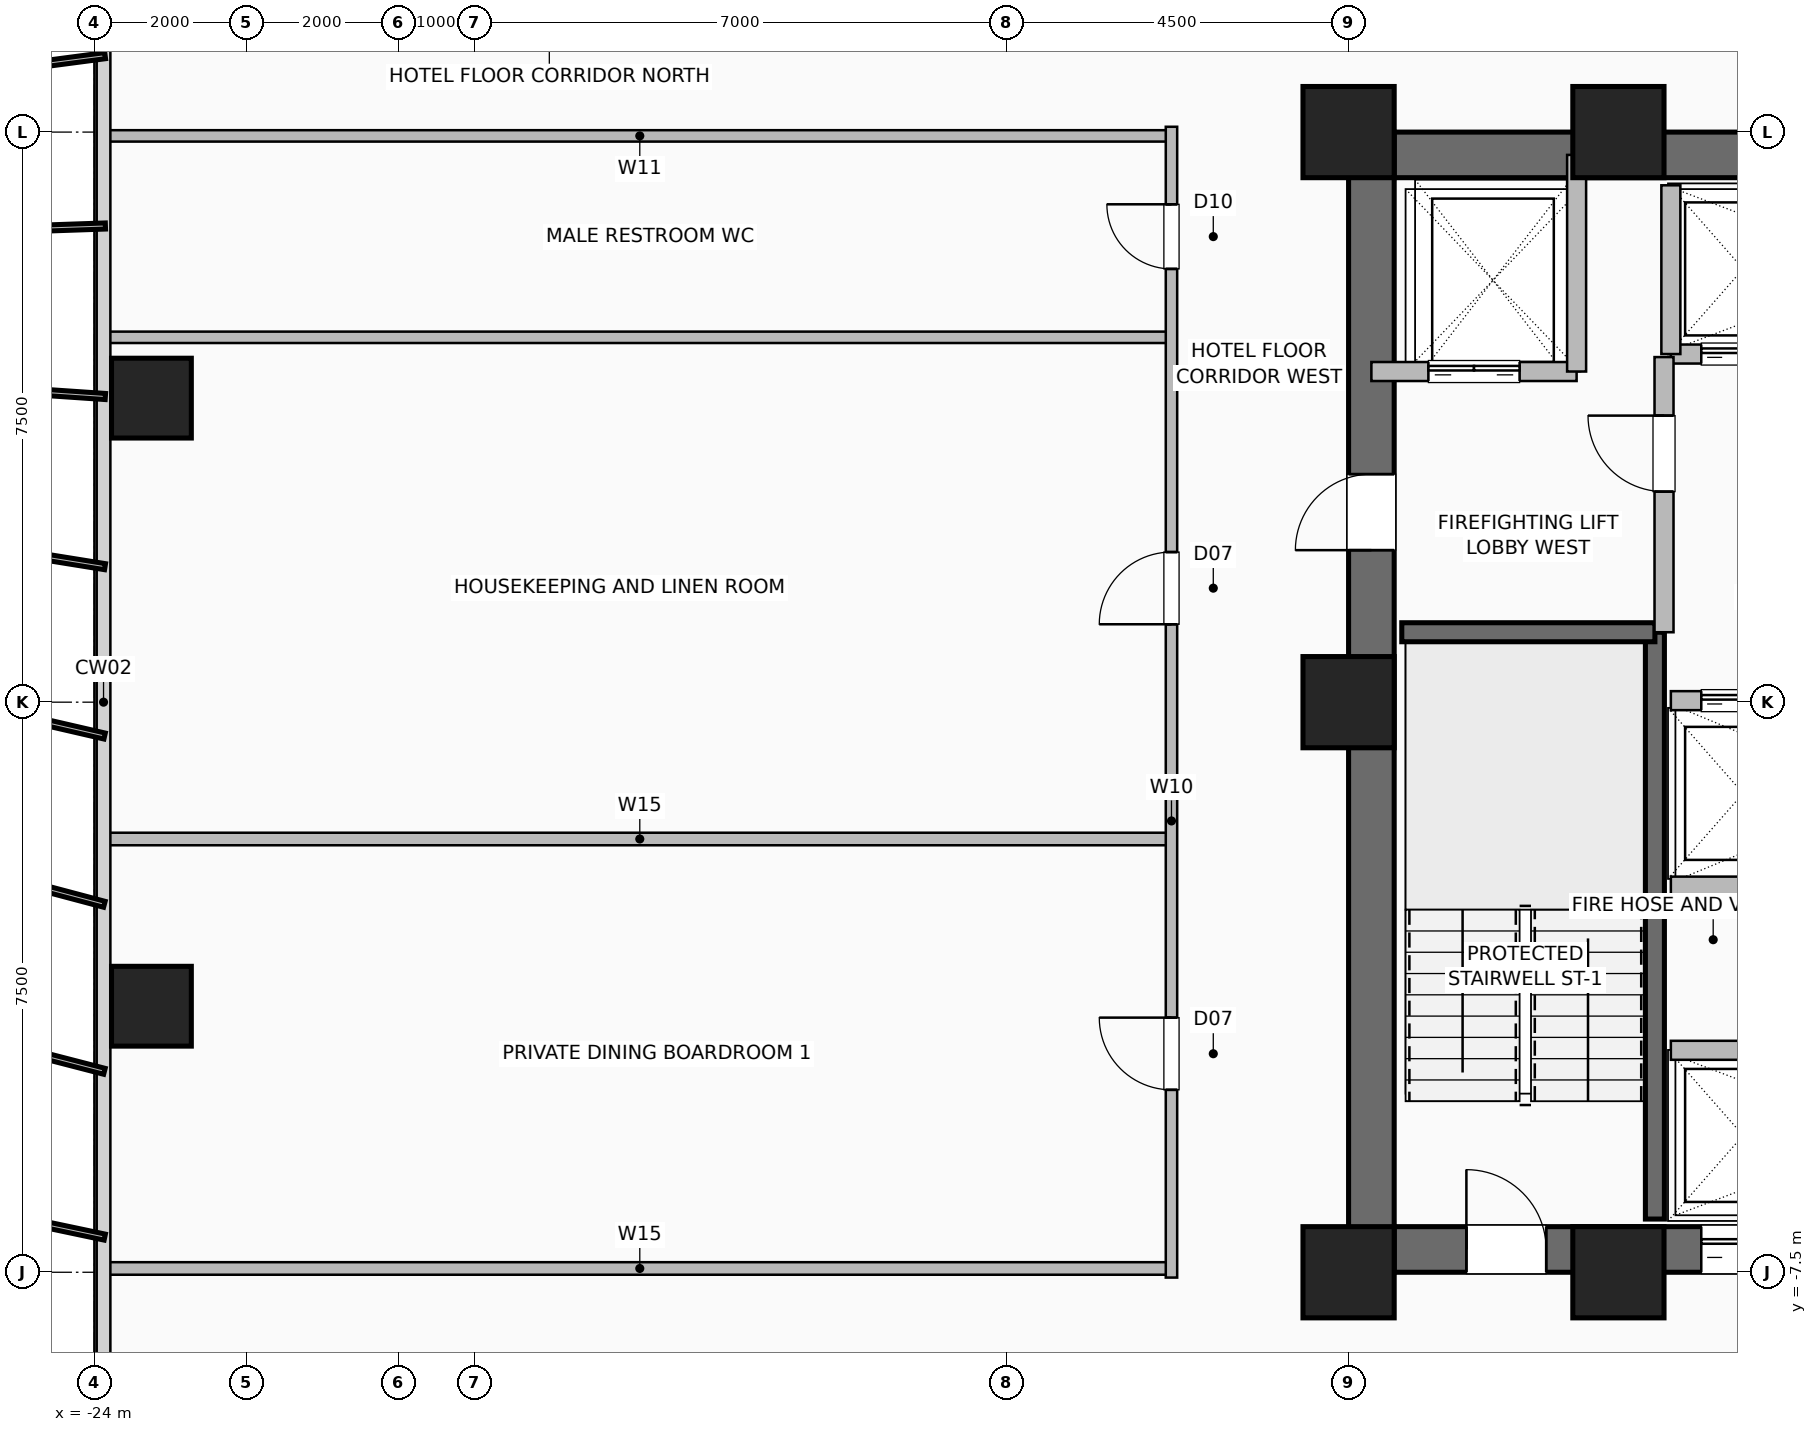
"""IFC4 building model, lengths in metres.
Left out: names, types, materials, properties, quantities, classifications, styles, units other than length and angle.
Written with IfcOpenShell. Run it as: python <this file> out.ifc"""

import sys

from ifc_helpers import new_model, si_unit, direction, frame, frame_2d, origin, origin_2d, place, context, subcontext, project, spatial, rectangle, hollow_rectangle, extrude, element, fill, save


model = new_model("IFC4")
c1 = context("Model", 3, precision=1e-05, world=origin(), true_north=direction((0.0, 1.0)))
c2 = subcontext(c1, "Body", "Model", "MODEL_VIEW")
j1 = project(units=[si_unit("LENGTHUNIT", "METRE"), si_unit("PLANEANGLEUNIT", "RADIAN")], contexts=[c1])
p1 = place(None, origin())
s1 = spatial("IfcSite", under=j1, at=p1, CompositionType="ELEMENT")
p2 = place(p1, origin())
s2 = spatial("IfcBuilding", under=s1, at=p2, CompositionType="ELEMENT")
p3 = place(p2, frame((0.0, 0.0, 69.0)))
s3 = spatial("IfcBuildingStorey", under=s2, at=p3, CompositionType="ELEMENT", Elevation=69.0)
for number, where, z_axis, x_axis in (
    (1, (-7.5, -7.5, 0.0), (0.0, 0.0, 1.0), (1.0, 0.0, 0.0)),
    (2, (-3.95, -7.5, 0.0), (0.0, 0.0, 1.0), (1.0, 0.0, 0.0)),
    (3, (-3.95, 7.5, 0.0), (0.0, 0.0, 1.0), (1.0, 0.0, 0.0)),
    (4, (-7.5, 7.5, 0.0), (0.0, 0.0, 1.0), (1.0, 0.0, 0.0)),
    (5, (-7.5, 0.0, 0.0), (0.0, 0.0, 1.0), (1.0, 0.0, 0.0)),
):
    element("IfcColumn", number, at=place(p3, frame(where, z_axis=z_axis, x_axis=x_axis)), inside=s3, PredefinedType="COLUMN", context=c2, shape_type="SweptSolid", body=[
        extrude(hollow_rectangle(XDim=1.2, YDim=1.2, WallThickness=0.055, at=origin_2d()), origin(), (0.0, 0.0, 1.0), 3.5),
    ])
for number, where, z_axis, x_axis in (
    (6, (-23.25, -4.0, 0.0), (0.0, 0.0, 1.0), (1.0, 0.0, 0.0)),
    (7, (-23.25, 4.0, 0.0), (0.0, 0.0, 1.0), (1.0, 0.0, 0.0)),
):
    element("IfcColumn", number, at=place(p3, frame(where, z_axis=z_axis, x_axis=x_axis)), inside=s3, PredefinedType="COLUMN", context=c2, shape_type="SweptSolid", body=[
        extrude(hollow_rectangle(XDim=1.05, YDim=1.05, WallThickness=0.05, at=origin_2d()), origin(), (0.0, 0.0, 1.0), 3.5),
    ])
p4 = place(p3, frame((-7.5, -7.2, 0.0), z_axis=(0.0, 0.0, 1.0), x_axis=(1.0, 0.0, 0.0)))
e8 = element("IfcWall", 8, at=p4, inside=s3, PredefinedType="SHEAR", context=c2, shape_type="SweptSolid", body=[
    extrude(rectangle(XDim=15.0, YDim=0.6, at=frame_2d((7.5, 0.0))), origin(), (0.0, 0.0, 1.0), 3.25),
])
p5 = place(p4, frame((1.55, 0.0, 0.0)))
e9 = element("IfcOpeningElement", 9, at=p5, cuts=e8, PredefinedType="OPENING", context=c2, shape_type="SweptSolid", body=[
    extrude(rectangle(XDim=1.05, YDim=2.08, at=frame_2d((0.525, 1.04))), frame((0.0, 0.31, 0.0), z_axis=(0.0, -1.0, 0.0), x_axis=(1.0, 0.0, 0.0)), (0.0, 0.0, 1.0), 0.62),
])
p6 = place(p4, frame((12.4, 0.0, 0.0)))
e10 = element("IfcOpeningElement", 10, at=p6, cuts=e8, PredefinedType="OPENING", context=c2, shape_type="SweptSolid", body=[
    extrude(rectangle(XDim=1.05, YDim=2.08, at=frame_2d((0.525, 1.04))), frame((0.0, 0.31, 0.0), z_axis=(0.0, -1.0, 0.0), x_axis=(1.0, 0.0, 0.0)), (0.0, 0.0, 1.0), 0.62),
])
p7 = place(p4, frame((4.64, 0.0, 0.0)))
e11 = element("IfcOpeningElement", 11, at=p7, cuts=e8, PredefinedType="OPENING", context=c2, shape_type="SweptSolid", body=[
    extrude(rectangle(XDim=1.1, YDim=2.2, at=frame_2d((0.55, 1.1))), frame((0.0, 0.31, 0.0), z_axis=(0.0, -1.0, 0.0), x_axis=(1.0, 0.0, 0.0)), (0.0, 0.0, 1.0), 0.62),
])
p8 = place(p4, frame((6.52, 0.0, 0.0)))
e12 = element("IfcOpeningElement", 12, at=p8, cuts=e8, PredefinedType="OPENING", context=c2, shape_type="SweptSolid", body=[
    extrude(rectangle(XDim=1.1, YDim=2.2, at=frame_2d((0.55, 1.1))), frame((0.0, 0.31, 0.0), z_axis=(0.0, -1.0, 0.0), x_axis=(1.0, 0.0, 0.0)), (0.0, 0.0, 1.0), 0.62),
])
p9 = place(p4, frame((8.4, 0.0, 0.0)))
e13 = element("IfcOpeningElement", 13, at=p9, cuts=e8, PredefinedType="OPENING", context=c2, shape_type="SweptSolid", body=[
    extrude(rectangle(XDim=1.1, YDim=2.2, at=frame_2d((0.55, 1.1))), frame((0.0, 0.31, 0.0), z_axis=(0.0, -1.0, 0.0), x_axis=(1.0, 0.0, 0.0)), (0.0, 0.0, 1.0), 0.62),
])
p10 = place(p3, frame((-7.5, 7.2, 0.0), z_axis=(0.0, 0.0, 1.0), x_axis=(1.0, 0.0, 0.0)))
e14 = element("IfcWall", 14, at=p10, inside=s3, PredefinedType="SHEAR", context=c2, shape_type="SweptSolid", body=[
    extrude(rectangle(XDim=15.0, YDim=0.6, at=frame_2d((7.5, 0.0))), origin(), (0.0, 0.0, 1.0), 3.25),
])
p11 = place(p3, frame((-7.2, -7.5, 0.0), z_axis=(0.0, 0.0, 1.0), x_axis=(0.0, 1.0, 0.0)))
e15 = element("IfcWall", 15, at=p11, inside=s3, PredefinedType="SHEAR", context=c2, shape_type="SweptSolid", body=[
    extrude(rectangle(XDim=15.0, YDim=0.6, at=frame_2d((7.5, 0.0))), origin(), (0.0, 0.0, 1.0), 3.25),
])
p12 = place(p11, frame((9.5, 0.0, 0.0)))
e16 = element("IfcOpeningElement", 16, at=p12, cuts=e15, PredefinedType="OPENING", context=c2, shape_type="SweptSolid", body=[
    extrude(rectangle(XDim=1.0, YDim=2.08, at=frame_2d((0.5, 1.04))), frame((0.0, 0.31, 0.0), z_axis=(0.0, -1.0, 0.0), x_axis=(1.0, 0.0, 0.0)), (0.0, 0.0, 1.0), 0.62),
])
p13 = place(p3, frame((-3.47, -6.8, 0.0), z_axis=(0.0, 0.0, 1.0), x_axis=(0.0, 1.0, 0.0)))
e17 = element("IfcWall", 17, at=p13, inside=s3, PredefinedType="SHEAR", context=c2, shape_type="SweptSolid", body=[
    extrude(rectangle(XDim=7.72, YDim=0.25, at=frame_2d((3.86, 0.0))), origin(), (0.0, 0.0, 1.0), 3.25),
])
p14 = place(p3, frame((-6.8, 0.92, 0.0), z_axis=(0.0, 0.0, 1.0), x_axis=(1.0, 0.0, 0.0)))
e18 = element("IfcWall", 18, at=p14, inside=s3, PredefinedType="SHEAR", context=c2, shape_type="SweptSolid", body=[
    extrude(rectangle(XDim=3.33, YDim=0.25, at=frame_2d((1.665, 0.0))), origin(), (0.0, 0.0, 1.0), 3.25),
])
p15 = place(p3, frame((-3.26, -4.58, 0.0), z_axis=(0.0, 0.0, 1.0), x_axis=(1.0, 0.0, 0.0)))
e19 = element("IfcWall", 19, at=p15, inside=s3, PredefinedType="SHEAR", context=c2, shape_type="SweptSolid", body=[
    extrude(rectangle(XDim=5.64, YDim=0.25, at=frame_2d((2.82, 0.0))), origin(), (0.0, 0.0, 1.0), 3.25),
])
p16 = place(p3, frame((-3.26, 0.02, 0.0), z_axis=(0.0, 0.0, 1.0), x_axis=(1.0, 0.0, 0.0)))
e20 = element("IfcWall", 20, at=p16, inside=s3, PredefinedType="SHEAR", context=c2, shape_type="SweptSolid", body=[
    extrude(rectangle(XDim=5.64, YDim=0.25, at=frame_2d((2.82, 0.0))), origin(), (0.0, 0.0, 1.0), 3.25),
])
p17 = place(p16, frame((0.4, 0.0, 0.0)))
e21 = element("IfcOpeningElement", 21, at=p17, cuts=e20, PredefinedType="OPENING", context=c2, shape_type="SweptSolid", body=[
    extrude(rectangle(XDim=1.1, YDim=2.2, at=frame_2d((0.55, 1.1))), frame((0.0, 0.135, 0.0), z_axis=(0.0, -1.0, 0.0), x_axis=(1.0, 0.0, 0.0)), (0.0, 0.0, 1.0), 0.27),
])
p18 = place(p16, frame((2.28, 0.0, 0.0)))
e22 = element("IfcOpeningElement", 22, at=p18, cuts=e20, PredefinedType="OPENING", context=c2, shape_type="SweptSolid", body=[
    extrude(rectangle(XDim=1.1, YDim=2.2, at=frame_2d((0.55, 1.1))), frame((0.0, 0.135, 0.0), z_axis=(0.0, -1.0, 0.0), x_axis=(1.0, 0.0, 0.0)), (0.0, 0.0, 1.0), 0.27),
])
p19 = place(p16, frame((4.16, 0.0, 0.0)))
e23 = element("IfcOpeningElement", 23, at=p19, cuts=e20, PredefinedType="OPENING", context=c2, shape_type="SweptSolid", body=[
    extrude(rectangle(XDim=1.1, YDim=2.2, at=frame_2d((0.55, 1.1))), frame((0.0, 0.135, 0.0), z_axis=(0.0, -1.0, 0.0), x_axis=(1.0, 0.0, 0.0)), (0.0, 0.0, 1.0), 0.27),
])
p20 = place(p3, frame((-3.26, -2.42, 0.0), z_axis=(0.0, 0.0, 1.0), x_axis=(1.0, 0.0, 0.0)))
e24 = element("IfcWall", 24, at=p20, inside=s3, PredefinedType="SHEAR", context=c2, shape_type="SweptSolid", body=[
    extrude(rectangle(XDim=5.64, YDim=0.25, at=frame_2d((2.82, 0.0))), origin(), (0.0, 0.0, 1.0), 3.25),
])
p21 = place(p3, frame((-3.26, 4.58, 0.0), z_axis=(0.0, 0.0, 1.0), x_axis=(1.0, 0.0, 0.0)))
e25 = element("IfcWall", 25, at=p21, inside=s3, PredefinedType="SHEAR", context=c2, shape_type="SweptSolid", body=[
    extrude(rectangle(XDim=5.64, YDim=0.25, at=frame_2d((2.82, 0.0))), origin(), (0.0, 0.0, 1.0), 3.25),
])
p22 = place(p21, frame((0.4, 0.0, 0.0)))
e26 = element("IfcOpeningElement", 26, at=p22, cuts=e25, PredefinedType="OPENING", context=c2, shape_type="SweptSolid", body=[
    extrude(rectangle(XDim=1.1, YDim=2.2, at=frame_2d((0.55, 1.1))), frame((0.0, 0.135, 0.0), z_axis=(0.0, -1.0, 0.0), x_axis=(1.0, 0.0, 0.0)), (0.0, 0.0, 1.0), 0.27),
])
p23 = place(p21, frame((2.28, 0.0, 0.0)))
e27 = element("IfcOpeningElement", 27, at=p23, cuts=e25, PredefinedType="OPENING", context=c2, shape_type="SweptSolid", body=[
    extrude(rectangle(XDim=1.1, YDim=2.2, at=frame_2d((0.55, 1.1))), frame((0.0, 0.135, 0.0), z_axis=(0.0, -1.0, 0.0), x_axis=(1.0, 0.0, 0.0)), (0.0, 0.0, 1.0), 0.27),
])
p24 = place(p21, frame((4.16, 0.0, 0.0)))
e28 = element("IfcOpeningElement", 28, at=p24, cuts=e25, PredefinedType="OPENING", context=c2, shape_type="SweptSolid", body=[
    extrude(rectangle(XDim=1.1, YDim=2.2, at=frame_2d((0.55, 1.1))), frame((0.0, 0.135, 0.0), z_axis=(0.0, -1.0, 0.0), x_axis=(1.0, 0.0, 0.0)), (0.0, 0.0, 1.0), 0.27),
])
p25 = place(p3, frame((-3.26, 4.58, 0.0), z_axis=(0.0, 0.0, 1.0), x_axis=(0.0, 1.0, 0.0)))
e29 = element("IfcWall", 29, at=p25, inside=s3, PredefinedType="SHEAR", context=c2, shape_type="SweptSolid", body=[
    extrude(rectangle(XDim=2.22, YDim=0.25, at=frame_2d((1.11, 0.0))), origin(), (0.0, 0.0, 1.0), 3.25),
])
p26 = place(p3, frame((-7.2, 4.35, 0.0), z_axis=(0.0, 0.0, 1.0), x_axis=(1.0, 0.0, 0.0)))
e30 = element("IfcWall", 30, at=p26, inside=s3, PredefinedType="SHEAR", context=c2, shape_type="SweptSolid", body=[
    extrude(rectangle(XDim=2.7, YDim=0.25, at=frame_2d((1.35, 0.0))), origin(), (0.0, 0.0, 1.0), 3.25),
])
p27 = place(p26, frame((0.75, 0.0, 0.0)))
e31 = element("IfcOpeningElement", 31, at=p27, cuts=e30, PredefinedType="OPENING", context=c2, shape_type="SweptSolid", body=[
    extrude(rectangle(XDim=1.2, YDim=2.2, at=frame_2d((0.6, 1.1))), frame((0.0, 0.135, 0.0), z_axis=(0.0, -1.0, 0.0), x_axis=(1.0, 0.0, 0.0)), (0.0, 0.0, 1.0), 0.27),
])
p28 = place(p3, frame((-4.5, 4.35, 0.0), z_axis=(0.0, 0.0, 1.0), x_axis=(0.0, 1.0, 0.0)))
e32 = element("IfcWall", 32, at=p28, inside=s3, PredefinedType="SHEAR", context=c2, shape_type="SweptSolid", body=[
    extrude(rectangle(XDim=2.85, YDim=0.25, at=frame_2d((1.425, 0.0))), origin(), (0.0, 0.0, 1.0), 3.25),
])
p29 = place(p3, frame((-3.35, 0.92, 0.0), z_axis=(0.0, 0.0, 1.0), x_axis=(0.0, 1.0, 0.0)))
e33 = element("IfcWall", 33, at=p29, inside=s3, PredefinedType="SHEAR", context=c2, shape_type="SweptSolid", body=[
    extrude(rectangle(XDim=3.62, YDim=0.25, at=frame_2d((1.81, 0.0))), origin(), (0.0, 0.0, 1.0), 3.25),
])
p30 = place(p29, frame((1.85, 0.0, 0.0)))
e34 = element("IfcOpeningElement", 34, at=p30, cuts=e33, PredefinedType="OPENING", context=c2, shape_type="SweptSolid", body=[
    extrude(rectangle(XDim=1.0, YDim=2.08, at=frame_2d((0.5, 1.04))), frame((0.0, 0.135, 0.0), z_axis=(0.0, -1.0, 0.0), x_axis=(1.0, 0.0, 0.0)), (0.0, 0.0, 1.0), 0.27),
])
for number, where, z_axis, x_axis in (
    (35, (-23.82, -7.45, 0.0), (0.0, 0.0, 1.0), (1.0, 0.0, 0.0)),
    (36, (-23.82, -1.8, 0.0), (0.0, 0.0, 1.0), (1.0, 0.0, 0.0)),
):
    element("IfcWall", number, at=place(p3, frame(where, z_axis=z_axis, x_axis=x_axis)), inside=s3, PredefinedType="PLUMBINGWALL", context=c2, shape_type="SweptSolid", body=[
        extrude(rectangle(XDim=13.99, YDim=0.165, at=frame_2d((6.995, 0.0))), origin(), (0.0, 0.0, 1.0), 3.25),
    ])
p31 = place(p3, frame((-23.82, 4.8, 0.0), z_axis=(0.0, 0.0, 1.0), x_axis=(1.0, 0.0, 0.0)))
e37 = element("IfcWall", 37, at=p31, inside=s3, PredefinedType="PARTITIONING", context=c2, shape_type="SweptSolid", body=[
    extrude(rectangle(XDim=13.99, YDim=0.15, at=frame_2d((6.995, 0.0))), origin(), (0.0, 0.0, 1.0), 2.818),
])
p32 = place(p3, frame((-23.82, 7.45, 0.0), z_axis=(0.0, 0.0, 1.0), x_axis=(1.0, 0.0, 0.0)))
e38 = element("IfcWall", 38, at=p32, inside=s3, PredefinedType="PARTITIONING", context=c2, shape_type="SweptSolid", body=[
    extrude(rectangle(XDim=13.99, YDim=0.15, at=frame_2d((6.995, 0.0))), origin(), (0.0, 0.0, 1.0), 3.25),
])
p33 = place(p3, frame((-9.83, -7.57, 0.0), z_axis=(0.0, 0.0, 1.0), x_axis=(0.0, 1.0, 0.0)))
e39 = element("IfcWall", 39, at=p33, inside=s3, PredefinedType="PARTITIONING", context=c2, shape_type="SweptSolid", body=[
    extrude(rectangle(XDim=15.14, YDim=0.15, at=frame_2d((7.57, 0.0))), origin(), (0.0, 0.0, 1.0), 3.25),
])
p34 = place(p33, frame((2.47, 0.0, 0.0)))
e40 = element("IfcOpeningElement", 40, at=p34, cuts=e39, PredefinedType="OPENING", context=c2, shape_type="SweptSolid", body=[
    extrude(rectangle(XDim=0.95, YDim=2.06, at=frame_2d((0.475, 1.03))), frame((0.0, 0.085, 0.0), z_axis=(0.0, -1.0, 0.0), x_axis=(1.0, 0.0, 0.0)), (0.0, 0.0, 1.0), 0.17),
])
p35 = place(p33, frame((8.595, 0.0, 0.0)))
e41 = element("IfcOpeningElement", 41, at=p35, cuts=e39, PredefinedType="OPENING", context=c2, shape_type="SweptSolid", body=[
    extrude(rectangle(XDim=0.95, YDim=2.06, at=frame_2d((0.475, 1.03))), frame((0.0, 0.085, 0.0), z_axis=(0.0, -1.0, 0.0), x_axis=(1.0, 0.0, 0.0)), (0.0, 0.0, 1.0), 0.17),
])
p36 = place(p33, frame((13.27, 0.0, 0.0)))
e42 = element("IfcOpeningElement", 42, at=p36, cuts=e39, PredefinedType="OPENING", context=c2, shape_type="SweptSolid", body=[
    extrude(rectangle(XDim=0.85, YDim=2.05, at=frame_2d((0.425, 1.025))), frame((0.0, 0.085, 0.0), z_axis=(0.0, -1.0, 0.0), x_axis=(1.0, 0.0, 0.0)), (0.0, 0.0, 1.0), 0.17),
])
p37 = place(p5, origin())
e43 = element("IfcDoor", 43, at=p37, inside=s3, OperationType="SINGLE_SWING_LEFT", PredefinedType="DOOR", context=c2, shape_type="SweptSolid", body=[
    extrude(rectangle(XDim=1.05, YDim=2.08, at=frame_2d((0.525, 1.04))), frame((0.0, 0.025, 0.0), z_axis=(0.0, -1.0, 0.0), x_axis=(1.0, 0.0, 0.0)), (0.0, 0.0, 1.0), 0.05),
])
fill(e9, e43)
p38 = place(p12, origin())
e44 = element("IfcDoor", 44, at=p38, inside=s3, OperationType="SINGLE_SWING_LEFT", PredefinedType="DOOR", context=c2, shape_type="SweptSolid", body=[
    extrude(rectangle(XDim=1.0, YDim=2.08, at=frame_2d((0.5, 1.04))), frame((0.0, 0.025, 0.0), z_axis=(0.0, -1.0, 0.0), x_axis=(1.0, 0.0, 0.0)), (0.0, 0.0, 1.0), 0.05),
])
fill(e16, e44)
p39 = place(p7, origin())
e45 = element("IfcDoor", 45, at=p39, inside=s3, OperationType="DOUBLE_DOOR_SLIDING", PredefinedType="DOOR", context=c2, shape_type="SweptSolid", body=[
    extrude(rectangle(XDim=1.1, YDim=2.2, at=frame_2d((0.55, 1.1))), frame((0.0, 0.025, 0.0), z_axis=(0.0, -1.0, 0.0), x_axis=(1.0, 0.0, 0.0)), (0.0, 0.0, 1.0), 0.05),
])
fill(e11, e45)
p40 = place(p17, origin())
e46 = element("IfcDoor", 46, at=p40, inside=s3, OperationType="DOUBLE_DOOR_SLIDING", PredefinedType="DOOR", context=c2, shape_type="SweptSolid", body=[
    extrude(rectangle(XDim=1.1, YDim=2.2, at=frame_2d((0.55, 1.1))), frame((0.0, 0.025, 0.0), z_axis=(0.0, -1.0, 0.0), x_axis=(1.0, 0.0, 0.0)), (0.0, 0.0, 1.0), 0.05),
])
fill(e21, e46)
p41 = place(p22, origin())
e47 = element("IfcDoor", 47, at=p41, inside=s3, OperationType="DOUBLE_DOOR_SLIDING", PredefinedType="DOOR", context=c2, shape_type="SweptSolid", body=[
    extrude(rectangle(XDim=1.1, YDim=2.2, at=frame_2d((0.55, 1.1))), frame((0.0, 0.025, 0.0), z_axis=(0.0, -1.0, 0.0), x_axis=(1.0, 0.0, 0.0)), (0.0, 0.0, 1.0), 0.05),
])
fill(e26, e47)
p42 = place(p27, origin())
e48 = element("IfcDoor", 48, at=p42, inside=s3, OperationType="DOUBLE_DOOR_SLIDING", PredefinedType="DOOR", context=c2, shape_type="SweptSolid", body=[
    extrude(rectangle(XDim=1.2, YDim=2.2, at=frame_2d((0.6, 1.1))), frame((0.0, 0.025, 0.0), z_axis=(0.0, -1.0, 0.0), x_axis=(1.0, 0.0, 0.0)), (0.0, 0.0, 1.0), 0.05),
])
fill(e31, e48)
p43 = place(p30, origin())
e49 = element("IfcDoor", 49, at=p43, inside=s3, OperationType="SINGLE_SWING_RIGHT", PredefinedType="DOOR", context=c2, shape_type="SweptSolid", body=[
    extrude(rectangle(XDim=1.0, YDim=2.08, at=frame_2d((0.5, 1.04))), frame((0.0, 0.025, 0.0), z_axis=(0.0, -1.0, 0.0), x_axis=(1.0, 0.0, 0.0)), (0.0, 0.0, 1.0), 0.05),
])
fill(e34, e49)
p44 = place(p34, origin())
e50 = element("IfcDoor", 50, at=p44, inside=s3, OperationType="SINGLE_SWING_RIGHT", PredefinedType="DOOR", context=c2, shape_type="SweptSolid", body=[
    extrude(rectangle(XDim=0.95, YDim=2.06, at=frame_2d((0.475, 1.03))), frame((0.0, 0.025, 0.0), z_axis=(0.0, -1.0, 0.0), x_axis=(1.0, 0.0, 0.0)), (0.0, 0.0, 1.0), 0.05),
])
fill(e40, e50)
p45 = place(p35, origin())
e51 = element("IfcDoor", 51, at=p45, inside=s3, OperationType="SINGLE_SWING_LEFT", PredefinedType="DOOR", context=c2, shape_type="SweptSolid", body=[
    extrude(rectangle(XDim=0.95, YDim=2.06, at=frame_2d((0.475, 1.03))), frame((0.0, 0.025, 0.0), z_axis=(0.0, -1.0, 0.0), x_axis=(1.0, 0.0, 0.0)), (0.0, 0.0, 1.0), 0.05),
])
fill(e41, e51)
p46 = place(p36, origin())
e52 = element("IfcDoor", 52, at=p46, inside=s3, OperationType="SINGLE_SWING_RIGHT", PredefinedType="DOOR", context=c2, shape_type="SweptSolid", body=[
    extrude(rectangle(XDim=0.85, YDim=2.05, at=frame_2d((0.425, 1.025))), frame((0.0, 0.025, 0.0), z_axis=(0.0, -1.0, 0.0), x_axis=(1.0, 0.0, 0.0)), (0.0, 0.0, 1.0), 0.05),
])
fill(e42, e52)
save(model, sys.argv[1])
